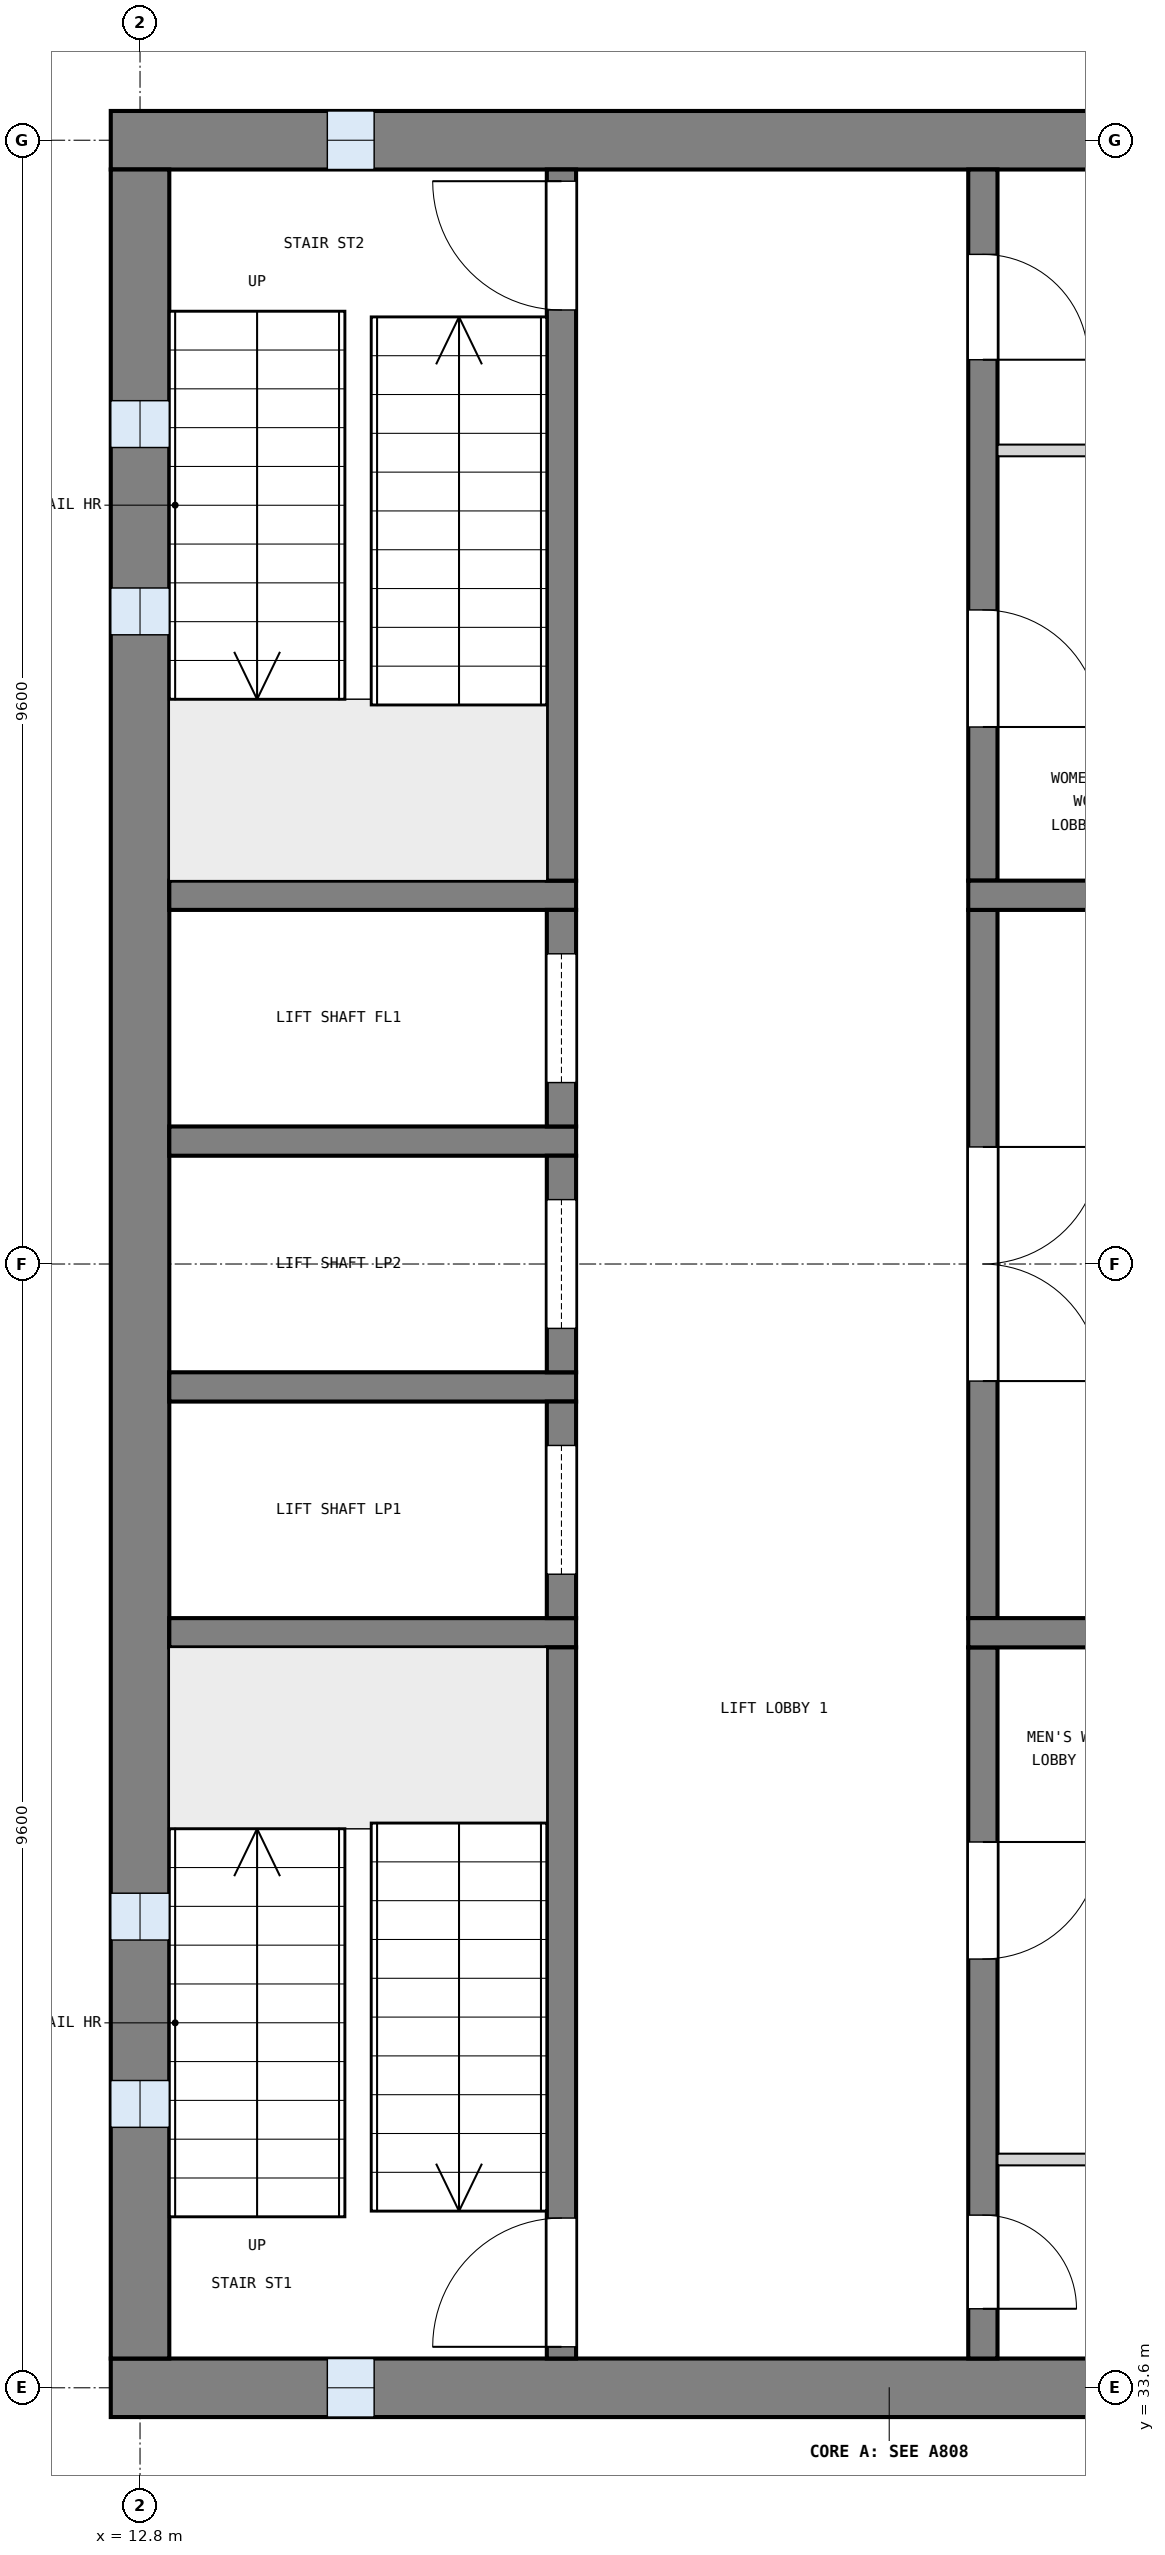
"""IFC4 building model, lengths in metres.
Left out: names, types, materials, properties, quantities, classifications, styles, units other than length and angle.
Written with IfcOpenShell. Run it as: python <this file> out.ifc"""

import sys

from ifc_helpers import new_model, si_unit, direction, frame, frame_2d, origin, place, context, subcontext, project, spatial, rectangle, extrude, element, fill, save


model = new_model("IFC4")
c1 = context("Model", 3, precision=1e-05, world=origin(), true_north=direction((0.0, 1.0)))
c2 = subcontext(c1, "Body", "Model", "MODEL_VIEW")
j1 = project(units=[si_unit("LENGTHUNIT", "METRE"), si_unit("PLANEANGLEUNIT", "RADIAN")], contexts=[c1])
p1 = place(None, origin())
s1 = spatial("IfcSite", under=j1, at=p1, CompositionType="ELEMENT")
p2 = place(p1, origin())
s2 = spatial("IfcBuilding", under=s1, at=p2, CompositionType="ELEMENT")
p3 = place(p2, frame((0.0, 0.0, 24.9)))
s3 = spatial("IfcBuildingStorey", under=s2, at=p3, CompositionType="ELEMENT", Elevation=24.9)
p4 = place(p3, frame((12.55, 52.8, 0.0), z_axis=(0.0, 0.0, 1.0), x_axis=(1.0, 0.0, 0.0)))
e1 = element("IfcWall", 1, at=p4, inside=s3, PredefinedType="SHEAR", context=c2, shape_type="SweptSolid", body=[
    extrude(rectangle(XDim=13.3, YDim=0.5, at=frame_2d((6.65, 0.0))), origin(), (0.0, 0.0, 1.0), 3.9),
])
p5 = place(p4, frame((1.85, 0.0, 1.0)))
e2 = element("IfcOpeningElement", 2, at=p5, cuts=e1, PredefinedType="OPENING", context=c2, shape_type="SweptSolid", body=[
    extrude(rectangle(XDim=0.4, YDim=2.0, at=frame_2d((0.2, 1.0))), frame((0.0, 0.26, 0.0), z_axis=(0.0, -1.0, 0.0), x_axis=(1.0, 0.0, 0.0)), (0.0, 0.0, 1.0), 0.52),
])
p6 = place(p3, frame((12.55, 33.6, 0.0), z_axis=(0.0, 0.0, 1.0), x_axis=(1.0, 0.0, 0.0)))
e3 = element("IfcWall", 3, at=p6, inside=s3, PredefinedType="SHEAR", context=c2, shape_type="SweptSolid", body=[
    extrude(rectangle(XDim=13.3, YDim=0.5, at=frame_2d((6.65, 0.0))), origin(), (0.0, 0.0, 1.0), 3.9),
])
p7 = place(p6, frame((1.85, 0.0, 1.0)))
e4 = element("IfcOpeningElement", 4, at=p7, cuts=e3, PredefinedType="OPENING", context=c2, shape_type="SweptSolid", body=[
    extrude(rectangle(XDim=0.4, YDim=2.0, at=frame_2d((0.2, 1.0))), frame((0.0, 0.26, 0.0), z_axis=(0.0, -1.0, 0.0), x_axis=(1.0, 0.0, 0.0)), (0.0, 0.0, 1.0), 0.52),
])
p8 = place(p3, frame((12.8, 33.85, 0.0), z_axis=(0.0, 0.0, 1.0), x_axis=(0.0, 1.0, 0.0)))
e5 = element("IfcWall", 5, at=p8, inside=s3, PredefinedType="SHEAR", context=c2, shape_type="SweptSolid", body=[
    extrude(rectangle(XDim=18.7, YDim=0.5, at=frame_2d((9.35, 0.0))), origin(), (0.0, 0.0, 1.0), 3.9),
])
p9 = place(p8, frame((1.975, 0.0, 1.0)))
e6 = element("IfcOpeningElement", 6, at=p9, cuts=e5, PredefinedType="OPENING", context=c2, shape_type="SweptSolid", body=[
    extrude(rectangle(XDim=0.4, YDim=2.0, at=frame_2d((0.2, 1.0))), frame((0.0, 0.26, 0.0), z_axis=(0.0, -1.0, 0.0), x_axis=(1.0, 0.0, 0.0)), (0.0, 0.0, 1.0), 0.52),
])
p10 = place(p8, frame((3.575, 0.0, 1.0)))
e7 = element("IfcOpeningElement", 7, at=p10, cuts=e5, PredefinedType="OPENING", context=c2, shape_type="SweptSolid", body=[
    extrude(rectangle(XDim=0.4, YDim=2.0, at=frame_2d((0.2, 1.0))), frame((0.0, 0.26, 0.0), z_axis=(0.0, -1.0, 0.0), x_axis=(1.0, 0.0, 0.0)), (0.0, 0.0, 1.0), 0.52),
])
p11 = place(p8, frame((14.725, 0.0, 1.0)))
e8 = element("IfcOpeningElement", 8, at=p11, cuts=e5, PredefinedType="OPENING", context=c2, shape_type="SweptSolid", body=[
    extrude(rectangle(XDim=0.4, YDim=2.0, at=frame_2d((0.2, 1.0))), frame((0.0, 0.26, 0.0), z_axis=(0.0, -1.0, 0.0), x_axis=(1.0, 0.0, 0.0)), (0.0, 0.0, 1.0), 0.52),
])
p12 = place(p8, frame((16.325, 0.0, 1.0)))
e9 = element("IfcOpeningElement", 9, at=p12, cuts=e5, PredefinedType="OPENING", context=c2, shape_type="SweptSolid", body=[
    extrude(rectangle(XDim=0.4, YDim=2.0, at=frame_2d((0.2, 1.0))), frame((0.0, 0.26, 0.0), z_axis=(0.0, -1.0, 0.0), x_axis=(1.0, 0.0, 0.0)), (0.0, 0.0, 1.0), 0.52),
])
for number, where, z_axis, x_axis in (
    (10, (13.05, 40.05, 0.0), (0.0, 0.0, 1.0), (1.0, 0.0, 0.0)),
    (11, (13.05, 42.15, 0.0), (0.0, 0.0, 1.0), (1.0, 0.0, 0.0)),
    (12, (13.05, 44.25, 0.0), (0.0, 0.0, 1.0), (1.0, 0.0, 0.0)),
    (13, (13.05, 46.35, 0.0), (0.0, 0.0, 1.0), (1.0, 0.0, 0.0)),
):
    element("IfcWall", number, at=place(p3, frame(where, z_axis=z_axis, x_axis=x_axis)), inside=s3, PredefinedType="SOLIDWALL", context=c2, shape_type="SweptSolid", body=[
        extrude(rectangle(XDim=3.475, YDim=0.25, at=frame_2d((1.737, 0.0))), origin(), (0.0, 0.0, 1.0), 3.6),
    ])
p13 = place(p3, frame((16.4, 33.85, 0.0), z_axis=(0.0, 0.0, 1.0), x_axis=(0.0, 1.0, 0.0)))
e14 = element("IfcWall", 14, at=p13, inside=s3, PredefinedType="SOLIDWALL", context=c2, shape_type="SweptSolid", body=[
    extrude(rectangle(XDim=6.075, YDim=0.25, at=frame_2d((3.038, 0.0))), origin(), (0.0, 0.0, 1.0), 3.6),
])
p14 = place(p13, frame((0.1, 0.0, 0.0)))
e15 = element("IfcOpeningElement", 15, at=p14, cuts=e14, PredefinedType="OPENING", context=c2, shape_type="SweptSolid", body=[
    extrude(rectangle(XDim=1.1, YDim=2.1, at=frame_2d((0.55, 1.05))), frame((0.0, 0.135, 0.0), z_axis=(0.0, -1.0, 0.0), x_axis=(1.0, 0.0, 0.0)), (0.0, 0.0, 1.0), 0.27),
])
p15 = place(p3, frame((16.4, 40.175, 0.0), z_axis=(0.0, 0.0, 1.0), x_axis=(0.0, 1.0, 0.0)))
e16 = element("IfcWall", 16, at=p15, inside=s3, PredefinedType="SOLIDWALL", context=c2, shape_type="SweptSolid", body=[
    extrude(rectangle(XDim=1.85, YDim=0.25, at=frame_2d((0.925, 0.0))), origin(), (0.0, 0.0, 1.0), 3.6),
])
p16 = place(p15, frame((0.375, 0.0, 0.0)))
e17 = element("IfcOpeningElement", 17, at=p16, cuts=e16, PredefinedType="OPENING", context=c2, shape_type="SweptSolid", body=[
    extrude(rectangle(XDim=1.1, YDim=2.1, at=frame_2d((0.55, 1.05))), frame((0.0, 0.135, 0.0), z_axis=(0.0, -1.0, 0.0), x_axis=(1.0, 0.0, 0.0)), (0.0, 0.0, 1.0), 0.27),
])
p17 = place(p3, frame((16.4, 42.275, 0.0), z_axis=(0.0, 0.0, 1.0), x_axis=(0.0, 1.0, 0.0)))
e18 = element("IfcWall", 18, at=p17, inside=s3, PredefinedType="SOLIDWALL", context=c2, shape_type="SweptSolid", body=[
    extrude(rectangle(XDim=1.85, YDim=0.25, at=frame_2d((0.925, 0.0))), origin(), (0.0, 0.0, 1.0), 3.6),
])
p18 = place(p17, frame((0.375, 0.0, 0.0)))
e19 = element("IfcOpeningElement", 19, at=p18, cuts=e18, PredefinedType="OPENING", context=c2, shape_type="SweptSolid", body=[
    extrude(rectangle(XDim=1.1, YDim=2.1, at=frame_2d((0.55, 1.05))), frame((0.0, 0.135, 0.0), z_axis=(0.0, -1.0, 0.0), x_axis=(1.0, 0.0, 0.0)), (0.0, 0.0, 1.0), 0.27),
])
p19 = place(p3, frame((16.4, 44.375, 0.0), z_axis=(0.0, 0.0, 1.0), x_axis=(0.0, 1.0, 0.0)))
e20 = element("IfcWall", 20, at=p19, inside=s3, PredefinedType="SOLIDWALL", context=c2, shape_type="SweptSolid", body=[
    extrude(rectangle(XDim=1.85, YDim=0.25, at=frame_2d((0.925, 0.0))), origin(), (0.0, 0.0, 1.0), 3.6),
])
p20 = place(p19, frame((0.375, 0.0, 0.0)))
e21 = element("IfcOpeningElement", 21, at=p20, cuts=e20, PredefinedType="OPENING", context=c2, shape_type="SweptSolid", body=[
    extrude(rectangle(XDim=1.1, YDim=2.1, at=frame_2d((0.55, 1.05))), frame((0.0, 0.135, 0.0), z_axis=(0.0, -1.0, 0.0), x_axis=(1.0, 0.0, 0.0)), (0.0, 0.0, 1.0), 0.27),
])
p21 = place(p3, frame((16.4, 46.475, 0.0), z_axis=(0.0, 0.0, 1.0), x_axis=(0.0, 1.0, 0.0)))
e22 = element("IfcWall", 22, at=p21, inside=s3, PredefinedType="SOLIDWALL", context=c2, shape_type="SweptSolid", body=[
    extrude(rectangle(XDim=6.075, YDim=0.25, at=frame_2d((3.038, 0.0))), origin(), (0.0, 0.0, 1.0), 3.6),
])
p22 = place(p21, frame((4.875, 0.0, 0.0)))
e23 = element("IfcOpeningElement", 23, at=p22, cuts=e22, PredefinedType="OPENING", context=c2, shape_type="SweptSolid", body=[
    extrude(rectangle(XDim=1.1, YDim=2.1, at=frame_2d((0.55, 1.05))), frame((0.0, 0.135, 0.0), z_axis=(0.0, -1.0, 0.0), x_axis=(1.0, 0.0, 0.0)), (0.0, 0.0, 1.0), 0.27),
])
p23 = place(p3, frame((20.0, 33.85, 0.0), z_axis=(0.0, 0.0, 1.0), x_axis=(0.0, 1.0, 0.0)))
e24 = element("IfcWall", 24, at=p23, inside=s3, PredefinedType="SOLIDWALL", context=c2, shape_type="SweptSolid", body=[
    extrude(rectangle(XDim=6.075, YDim=0.25, at=frame_2d((3.038, 0.0))), origin(), (0.0, 0.0, 1.0), 3.6),
])
p24 = place(p23, frame((0.425, 0.0, 0.0)))
e25 = element("IfcOpeningElement", 25, at=p24, cuts=e24, PredefinedType="OPENING", context=c2, shape_type="SweptSolid", body=[
    extrude(rectangle(XDim=0.8, YDim=2.1, at=frame_2d((0.4, 1.05))), frame((0.0, 0.135, 0.0), z_axis=(0.0, -1.0, 0.0), x_axis=(1.0, 0.0, 0.0)), (0.0, 0.0, 1.0), 0.27),
])
p25 = place(p23, frame((3.413, 0.0, 0.0)))
e26 = element("IfcOpeningElement", 26, at=p25, cuts=e24, PredefinedType="OPENING", context=c2, shape_type="SweptSolid", body=[
    extrude(rectangle(XDim=1.0, YDim=2.1, at=frame_2d((0.5, 1.05))), frame((0.0, 0.135, 0.0), z_axis=(0.0, -1.0, 0.0), x_axis=(1.0, 0.0, 0.0)), (0.0, 0.0, 1.0), 0.27),
])
p26 = place(p3, frame((20.0, 40.175, 0.0), z_axis=(0.0, 0.0, 1.0), x_axis=(0.0, 1.0, 0.0)))
e27 = element("IfcWall", 27, at=p26, inside=s3, PredefinedType="SOLIDWALL", context=c2, shape_type="SweptSolid", body=[
    extrude(rectangle(XDim=6.05, YDim=0.25, at=frame_2d((3.025, 0.0))), origin(), (0.0, 0.0, 1.0), 3.6),
])
p27 = place(p26, frame((2.025, 0.0, 0.0)))
e28 = element("IfcOpeningElement", 28, at=p27, cuts=e27, PredefinedType="OPENING", context=c2, shape_type="SweptSolid", body=[
    extrude(rectangle(XDim=2.0, YDim=2.1, at=frame_2d((1.0, 1.05))), frame((0.0, 0.135, 0.0), z_axis=(0.0, -1.0, 0.0), x_axis=(1.0, 0.0, 0.0)), (0.0, 0.0, 1.0), 0.27),
])
p28 = place(p3, frame((20.0, 46.475, 0.0), z_axis=(0.0, 0.0, 1.0), x_axis=(0.0, 1.0, 0.0)))
e29 = element("IfcWall", 29, at=p28, inside=s3, PredefinedType="SOLIDWALL", context=c2, shape_type="SweptSolid", body=[
    extrude(rectangle(XDim=6.075, YDim=0.25, at=frame_2d((3.038, 0.0))), origin(), (0.0, 0.0, 1.0), 3.6),
])
p29 = place(p28, frame((1.312, 0.0, 0.0)))
e30 = element("IfcOpeningElement", 30, at=p29, cuts=e29, PredefinedType="OPENING", context=c2, shape_type="SweptSolid", body=[
    extrude(rectangle(XDim=1.0, YDim=2.1, at=frame_2d((0.5, 1.05))), frame((0.0, 0.135, 0.0), z_axis=(0.0, -1.0, 0.0), x_axis=(1.0, 0.0, 0.0)), (0.0, 0.0, 1.0), 0.27),
])
p30 = place(p28, frame((4.45, 0.0, 0.0)))
e31 = element("IfcOpeningElement", 31, at=p30, cuts=e29, PredefinedType="OPENING", context=c2, shape_type="SweptSolid", body=[
    extrude(rectangle(XDim=0.9, YDim=2.1, at=frame_2d((0.45, 1.05))), frame((0.0, 0.135, 0.0), z_axis=(0.0, -1.0, 0.0), x_axis=(1.0, 0.0, 0.0)), (0.0, 0.0, 1.0), 0.27),
])
for number, where, z_axis, x_axis in (
    (32, (19.875, 40.05, 0.0), (0.0, 0.0, 1.0), (1.0, 0.0, 0.0)),
    (33, (19.875, 46.35, 0.0), (0.0, 0.0, 1.0), (1.0, 0.0, 0.0)),
):
    element("IfcWall", number, at=place(p3, frame(where, z_axis=z_axis, x_axis=x_axis)), inside=s3, PredefinedType="SOLIDWALL", context=c2, shape_type="SweptSolid", body=[
        extrude(rectangle(XDim=5.475, YDim=0.25, at=frame_2d((2.738, 0.0))), origin(), (0.0, 0.0, 1.0), 3.6),
    ])
for number, where, z_axis, x_axis in (
    (34, (20.125, 35.55, 0.0), (0.0, 0.0, 1.0), (1.0, 0.0, 0.0)),
    (35, (20.125, 50.15, 0.0), (0.0, 0.0, 1.0), (1.0, 0.0, 0.0)),
):
    element("IfcWall", number, at=place(p3, frame(where, z_axis=z_axis, x_axis=x_axis)), inside=s3, PredefinedType="PARTITIONING", context=c2, shape_type="SweptSolid", body=[
        extrude(rectangle(XDim=5.225, YDim=0.1, at=frame_2d((2.613, 0.0))), origin(), (0.0, 0.0, 1.0), 3.6),
    ])
p31 = place(p9, origin())
e36 = element("IfcWindow", 36, at=p31, inside=s3, PartitioningType="SINGLE_PANEL", PredefinedType="WINDOW", context=c2, shape_type="SweptSolid", body=[
    extrude(rectangle(XDim=0.4, YDim=2.0, at=frame_2d((0.2, 1.0))), frame((0.0, 0.03, 0.0), z_axis=(0.0, -1.0, 0.0), x_axis=(1.0, 0.0, 0.0)), (0.0, 0.0, 1.0), 0.06),
])
fill(e6, e36)
p32 = place(p10, origin())
e37 = element("IfcWindow", 37, at=p32, inside=s3, PartitioningType="SINGLE_PANEL", PredefinedType="WINDOW", context=c2, shape_type="SweptSolid", body=[
    extrude(rectangle(XDim=0.4, YDim=2.0, at=frame_2d((0.2, 1.0))), frame((0.0, 0.03, 0.0), z_axis=(0.0, -1.0, 0.0), x_axis=(1.0, 0.0, 0.0)), (0.0, 0.0, 1.0), 0.06),
])
fill(e7, e37)
p33 = place(p11, origin())
e38 = element("IfcWindow", 38, at=p33, inside=s3, PartitioningType="SINGLE_PANEL", PredefinedType="WINDOW", context=c2, shape_type="SweptSolid", body=[
    extrude(rectangle(XDim=0.4, YDim=2.0, at=frame_2d((0.2, 1.0))), frame((0.0, 0.03, 0.0), z_axis=(0.0, -1.0, 0.0), x_axis=(1.0, 0.0, 0.0)), (0.0, 0.0, 1.0), 0.06),
])
fill(e8, e38)
p34 = place(p12, origin())
e39 = element("IfcWindow", 39, at=p34, inside=s3, PartitioningType="SINGLE_PANEL", PredefinedType="WINDOW", context=c2, shape_type="SweptSolid", body=[
    extrude(rectangle(XDim=0.4, YDim=2.0, at=frame_2d((0.2, 1.0))), frame((0.0, 0.03, 0.0), z_axis=(0.0, -1.0, 0.0), x_axis=(1.0, 0.0, 0.0)), (0.0, 0.0, 1.0), 0.06),
])
fill(e9, e39)
p35 = place(p7, origin())
e40 = element("IfcWindow", 40, at=p35, inside=s3, PartitioningType="SINGLE_PANEL", PredefinedType="WINDOW", context=c2, shape_type="SweptSolid", body=[
    extrude(rectangle(XDim=0.4, YDim=2.0, at=frame_2d((0.2, 1.0))), frame((0.0, 0.03, 0.0), z_axis=(0.0, -1.0, 0.0), x_axis=(1.0, 0.0, 0.0)), (0.0, 0.0, 1.0), 0.06),
])
fill(e4, e40)
p36 = place(p5, origin())
e41 = element("IfcWindow", 41, at=p36, inside=s3, PartitioningType="SINGLE_PANEL", PredefinedType="WINDOW", context=c2, shape_type="SweptSolid", body=[
    extrude(rectangle(XDim=0.4, YDim=2.0, at=frame_2d((0.2, 1.0))), frame((0.0, 0.03, 0.0), z_axis=(0.0, -1.0, 0.0), x_axis=(1.0, 0.0, 0.0)), (0.0, 0.0, 1.0), 0.06),
])
fill(e2, e41)
p37 = place(p14, origin())
e42 = element("IfcDoor", 42, at=p37, inside=s3, OperationType="SINGLE_SWING_LEFT", PredefinedType="DOOR", context=c2, shape_type="SweptSolid", body=[
    extrude(rectangle(XDim=1.1, YDim=2.1, at=frame_2d((0.55, 1.05))), frame((0.0, 0.025, 0.0), z_axis=(0.0, -1.0, 0.0), x_axis=(1.0, 0.0, 0.0)), (0.0, 0.0, 1.0), 0.05),
])
fill(e15, e42)
p38 = place(p22, origin())
e43 = element("IfcDoor", 43, at=p38, inside=s3, OperationType="SINGLE_SWING_RIGHT", PredefinedType="DOOR", context=c2, shape_type="SweptSolid", body=[
    extrude(rectangle(XDim=1.1, YDim=2.1, at=frame_2d((0.55, 1.05))), frame((0.0, 0.025, 0.0), z_axis=(0.0, -1.0, 0.0), x_axis=(1.0, 0.0, 0.0)), (0.0, 0.0, 1.0), 0.05),
])
fill(e23, e43)
p39 = place(p16, origin())
e44 = element("IfcDoor", 44, at=p39, inside=s3, OperationType="SLIDING_TO_LEFT", PredefinedType="DOOR", context=c2, shape_type="SweptSolid", body=[
    extrude(rectangle(XDim=1.1, YDim=2.1, at=frame_2d((0.55, 1.05))), frame((0.0, 0.025, 0.0), z_axis=(0.0, -1.0, 0.0), x_axis=(1.0, 0.0, 0.0)), (0.0, 0.0, 1.0), 0.05),
])
fill(e17, e44)
p40 = place(p18, origin())
e45 = element("IfcDoor", 45, at=p40, inside=s3, OperationType="SLIDING_TO_LEFT", PredefinedType="DOOR", context=c2, shape_type="SweptSolid", body=[
    extrude(rectangle(XDim=1.1, YDim=2.1, at=frame_2d((0.55, 1.05))), frame((0.0, 0.025, 0.0), z_axis=(0.0, -1.0, 0.0), x_axis=(1.0, 0.0, 0.0)), (0.0, 0.0, 1.0), 0.05),
])
fill(e19, e45)
p41 = place(p20, origin())
e46 = element("IfcDoor", 46, at=p41, inside=s3, OperationType="SLIDING_TO_LEFT", PredefinedType="DOOR", context=c2, shape_type="SweptSolid", body=[
    extrude(rectangle(XDim=1.1, YDim=2.1, at=frame_2d((0.55, 1.05))), frame((0.0, 0.025, 0.0), z_axis=(0.0, -1.0, 0.0), x_axis=(1.0, 0.0, 0.0)), (0.0, 0.0, 1.0), 0.05),
])
fill(e21, e46)
p42 = place(p27, frame((2.0, 0.0, 0.0), z_axis=(0.0, 0.0, 1.0), x_axis=(-1.0, 0.0, 0.0)))
e47 = element("IfcDoor", 47, at=p42, inside=s3, OperationType="DOUBLE_DOOR_SINGLE_SWING", PredefinedType="DOOR", context=c2, shape_type="SweptSolid", body=[
    extrude(rectangle(XDim=2.0, YDim=2.1, at=frame_2d((1.0, 1.05))), frame((0.0, 0.025, 0.0), z_axis=(0.0, -1.0, 0.0), x_axis=(1.0, 0.0, 0.0)), (0.0, 0.0, 1.0), 0.05),
])
fill(e28, e47)
p43 = place(p24, frame((0.8, 0.0, 0.0), z_axis=(0.0, 0.0, 1.0), x_axis=(-1.0, 0.0, 0.0)))
e48 = element("IfcDoor", 48, at=p43, inside=s3, OperationType="SINGLE_SWING_RIGHT", PredefinedType="DOOR", context=c2, shape_type="SweptSolid", body=[
    extrude(rectangle(XDim=0.8, YDim=2.1, at=frame_2d((0.4, 1.05))), frame((0.0, 0.025, 0.0), z_axis=(0.0, -1.0, 0.0), x_axis=(1.0, 0.0, 0.0)), (0.0, 0.0, 1.0), 0.05),
])
fill(e25, e48)
p44 = place(p25, frame((1.0, 0.0, 0.0), z_axis=(0.0, 0.0, 1.0), x_axis=(-1.0, 0.0, 0.0)))
e49 = element("IfcDoor", 49, at=p44, inside=s3, OperationType="SINGLE_SWING_LEFT", PredefinedType="DOOR", context=c2, shape_type="SweptSolid", body=[
    extrude(rectangle(XDim=1.0, YDim=2.1, at=frame_2d((0.5, 1.05))), frame((0.0, 0.025, 0.0), z_axis=(0.0, -1.0, 0.0), x_axis=(1.0, 0.0, 0.0)), (0.0, 0.0, 1.0), 0.05),
])
fill(e26, e49)
p45 = place(p29, frame((1.0, 0.0, 0.0), z_axis=(0.0, 0.0, 1.0), x_axis=(-1.0, 0.0, 0.0)))
e50 = element("IfcDoor", 50, at=p45, inside=s3, OperationType="SINGLE_SWING_RIGHT", PredefinedType="DOOR", context=c2, shape_type="SweptSolid", body=[
    extrude(rectangle(XDim=1.0, YDim=2.1, at=frame_2d((0.5, 1.05))), frame((0.0, 0.025, 0.0), z_axis=(0.0, -1.0, 0.0), x_axis=(1.0, 0.0, 0.0)), (0.0, 0.0, 1.0), 0.05),
])
fill(e30, e50)
p46 = place(p30, frame((0.9, 0.0, 0.0), z_axis=(0.0, 0.0, 1.0), x_axis=(-1.0, 0.0, 0.0)))
e51 = element("IfcDoor", 51, at=p46, inside=s3, OperationType="SINGLE_SWING_RIGHT", PredefinedType="DOOR", context=c2, shape_type="SweptSolid", body=[
    extrude(rectangle(XDim=0.9, YDim=2.1, at=frame_2d((0.45, 1.05))), frame((0.0, 0.025, 0.0), z_axis=(0.0, -1.0, 0.0), x_axis=(1.0, 0.0, 0.0)), (0.0, 0.0, 1.0), 0.05),
])
fill(e31, e51)
save(model, sys.argv[1])
